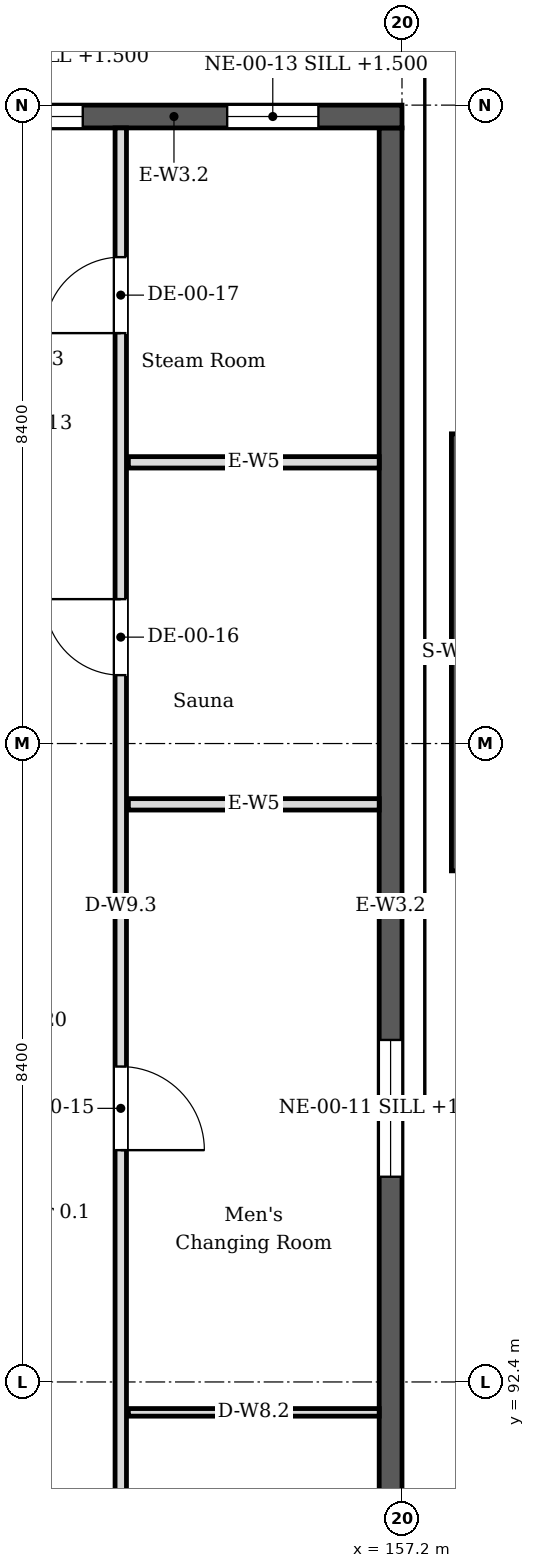
"""IFC4 building model, lengths in metres.
Left out: names, types, materials, properties, quantities, classifications, styles, units other than length and angle.
Written with IfcOpenShell. Run it as: python <this file> out.ifc"""

import sys

from ifc_helpers import new_model, si_unit, direction, frame, frame_2d, origin, place, context, subcontext, project, spatial, rectangle, extrude, element, fill, save


model = new_model("IFC4")
c1 = context("Model", 3, precision=1e-05, world=origin(), true_north=direction((0.0, 1.0)))
c2 = subcontext(c1, "Body", "Model", "MODEL_VIEW")
j1 = project(units=[si_unit("LENGTHUNIT", "METRE"), si_unit("PLANEANGLEUNIT", "RADIAN")], contexts=[c1])
p1 = place(None, origin())
s1 = spatial("IfcSite", under=j1, at=p1, CompositionType="ELEMENT")
p2 = place(p1, origin())
s2 = spatial("IfcBuilding", under=s1, at=p2, CompositionType="ELEMENT")
p3 = place(p2, origin())
s3 = spatial("IfcBuildingStorey", under=s2, at=p3, CompositionType="ELEMENT", Elevation=0.0)
p4 = place(p3, frame((158.0, 99.125, 0.0), z_axis=(0.0, 0.0, 1.0), x_axis=(0.0, 1.0, 0.0)))
e1 = element("IfcWall", 1, at=p4, inside=s3, PredefinedType="SOLIDWALL", context=c2, shape_type="SweptSolid", body=[
    extrude(rectangle(XDim=5.75, YDim=0.3, at=frame_2d((2.875, 0.0))), origin(), (0.0, 0.0, 1.0), 3.4),
])
p5 = place(p3, frame((157.05, 84.0, 0.0), z_axis=(0.0, 0.0, 1.0), x_axis=(0.0, 1.0, 0.0)))
e2 = element("IfcWall", 2, at=p5, inside=s3, PredefinedType="SOLIDWALL", context=c2, shape_type="SweptSolid", body=[
    extrude(rectangle(XDim=24.9, YDim=0.3, at=frame_2d((12.45, 0.0))), origin(), (0.0, 0.0, 1.0), 5.72),
])
p6 = place(p5, frame((3.1, 0.0, 1.5)))
e3 = element("IfcOpeningElement", 3, at=p6, cuts=e2, PredefinedType="OPENING", context=c2, shape_type="SweptSolid", body=[
    extrude(rectangle(XDim=1.8, YDim=1.2, at=frame_2d((0.9, 0.6))), frame((0.0, 0.16, 0.0), z_axis=(0.0, -1.0, 0.0), x_axis=(1.0, 0.0, 0.0)), (0.0, 0.0, 1.0), 0.32),
])
p7 = place(p5, frame((11.1, 0.0, 1.5)))
e4 = element("IfcOpeningElement", 4, at=p7, cuts=e2, PredefinedType="OPENING", context=c2, shape_type="SweptSolid", body=[
    extrude(rectangle(XDim=1.8, YDim=1.2, at=frame_2d((0.9, 0.6))), frame((0.0, 0.16, 0.0), z_axis=(0.0, -1.0, 0.0), x_axis=(1.0, 0.0, 0.0)), (0.0, 0.0, 1.0), 0.32),
])
p8 = place(p3, frame((151.2, 109.05, 0.0), z_axis=(0.0, 0.0, 1.0), x_axis=(1.0, 0.0, 0.0)))
e5 = element("IfcWall", 5, at=p8, inside=s3, PredefinedType="SOLIDWALL", context=c2, shape_type="SweptSolid", body=[
    extrude(rectangle(XDim=6.0, YDim=0.3, at=frame_2d((3.0, 0.0))), origin(), (0.0, 0.0, 1.0), 5.72),
])
p9 = place(p8, frame((0.6, 0.0, 1.5)))
e6 = element("IfcOpeningElement", 6, at=p9, cuts=e5, PredefinedType="OPENING", context=c2, shape_type="SweptSolid", body=[
    extrude(rectangle(XDim=1.2, YDim=1.2, at=frame_2d((0.6, 0.6))), frame((0.0, 0.16, 0.0), z_axis=(0.0, -1.0, 0.0), x_axis=(1.0, 0.0, 0.0)), (0.0, 0.0, 1.0), 0.32),
])
p10 = place(p8, frame((3.7, 0.0, 1.5)))
e7 = element("IfcOpeningElement", 7, at=p10, cuts=e5, PredefinedType="OPENING", context=c2, shape_type="SweptSolid", body=[
    extrude(rectangle(XDim=1.2, YDim=1.2, at=frame_2d((0.6, 0.6))), frame((0.0, 0.16, 0.0), z_axis=(0.0, -1.0, 0.0), x_axis=(1.0, 0.0, 0.0)), (0.0, 0.0, 1.0), 0.32),
])
p11 = place(p3, frame((153.5, 84.2, 0.0), z_axis=(0.0, 0.0, 1.0), x_axis=(0.0, 1.0, 0.0)))
e8 = element("IfcWall", 8, at=p11, inside=s3, PredefinedType="PARTITIONING", context=c2, shape_type="SweptSolid", body=[
    extrude(rectangle(XDim=24.7, YDim=0.15, at=frame_2d((12.35, 0.0))), origin(), (0.0, 0.0, 1.0), 5.72),
])
p12 = place(p11, frame((3.25, 0.0, 0.0)))
e9 = element("IfcOpeningElement", 9, at=p12, cuts=e8, PredefinedType="OPENING", context=c2, shape_type="SweptSolid", body=[
    extrude(rectangle(XDim=1.1, YDim=2.4, at=frame_2d((0.55, 1.2))), frame((0.0, 0.085, 0.0), z_axis=(0.0, -1.0, 0.0), x_axis=(1.0, 0.0, 0.0)), (0.0, 0.0, 1.0), 0.17),
])
p13 = place(p11, frame((11.25, 0.0, 0.0)))
e10 = element("IfcOpeningElement", 10, at=p13, cuts=e8, PredefinedType="OPENING", context=c2, shape_type="SweptSolid", body=[
    extrude(rectangle(XDim=1.1, YDim=2.4, at=frame_2d((0.55, 1.2))), frame((0.0, 0.085, 0.0), z_axis=(0.0, -1.0, 0.0), x_axis=(1.0, 0.0, 0.0)), (0.0, 0.0, 1.0), 0.17),
])
p14 = place(p11, frame((17.5, 0.0, 0.0)))
e11 = element("IfcOpeningElement", 11, at=p14, cuts=e8, PredefinedType="OPENING", context=c2, shape_type="SweptSolid", body=[
    extrude(rectangle(XDim=1.0, YDim=2.1, at=frame_2d((0.5, 1.05))), frame((0.0, 0.085, 0.0), z_axis=(0.0, -1.0, 0.0), x_axis=(1.0, 0.0, 0.0)), (0.0, 0.0, 1.0), 0.17),
])
p15 = place(p11, frame((22.0, 0.0, 0.0)))
e12 = element("IfcOpeningElement", 12, at=p15, cuts=e8, PredefinedType="OPENING", context=c2, shape_type="SweptSolid", body=[
    extrude(rectangle(XDim=1.0, YDim=2.1, at=frame_2d((0.5, 1.05))), frame((0.0, 0.085, 0.0), z_axis=(0.0, -1.0, 0.0), x_axis=(1.0, 0.0, 0.0)), (0.0, 0.0, 1.0), 0.17),
])
p16 = place(p3, frame((153.6, 92.0, 0.0), z_axis=(0.0, 0.0, 1.0), x_axis=(1.0, 0.0, 0.0)))
e13 = element("IfcWall", 13, at=p16, inside=s3, PredefinedType="PARTITIONING", context=c2, shape_type="SweptSolid", body=[
    extrude(rectangle(XDim=3.3, YDim=0.1, at=frame_2d((1.65, 0.0))), origin(), (0.0, 0.0, 1.0), 5.72),
])
for number, where, z_axis, x_axis in (
    (14, (153.6, 100.0, 0.0), (0.0, 0.0, 1.0), (1.0, 0.0, 0.0)),
    (15, (153.6, 104.5, 0.0), (0.0, 0.0, 1.0), (1.0, 0.0, 0.0)),
):
    element("IfcWall", number, at=place(p3, frame(where, z_axis=z_axis, x_axis=x_axis)), inside=s3, PredefinedType="PARTITIONING", context=c2, shape_type="SweptSolid", body=[
        extrude(rectangle(XDim=3.3, YDim=0.15, at=frame_2d((1.65, 0.0))), origin(), (0.0, 0.0, 1.0), 5.72),
    ])
p17 = place(p7, origin())
e16 = element("IfcWindow", 16, at=p17, inside=s3, PartitioningType="SINGLE_PANEL", PredefinedType="WINDOW", context=c2, shape_type="SweptSolid", body=[
    extrude(rectangle(XDim=1.8, YDim=1.2, at=frame_2d((0.9, 0.6))), frame((0.0, 0.03, 0.0), z_axis=(0.0, -1.0, 0.0), x_axis=(1.0, 0.0, 0.0)), (0.0, 0.0, 1.0), 0.06),
])
fill(e4, e16)
p18 = place(p9, origin())
e17 = element("IfcWindow", 17, at=p18, inside=s3, PartitioningType="SINGLE_PANEL", PredefinedType="WINDOW", context=c2, shape_type="SweptSolid", body=[
    extrude(rectangle(XDim=1.2, YDim=1.2, at=frame_2d((0.6, 0.6))), frame((0.0, 0.03, 0.0), z_axis=(0.0, -1.0, 0.0), x_axis=(1.0, 0.0, 0.0)), (0.0, 0.0, 1.0), 0.06),
])
fill(e6, e17)
p19 = place(p10, origin())
e18 = element("IfcWindow", 18, at=p19, inside=s3, PartitioningType="SINGLE_PANEL", PredefinedType="WINDOW", context=c2, shape_type="SweptSolid", body=[
    extrude(rectangle(XDim=1.2, YDim=1.2, at=frame_2d((0.6, 0.6))), frame((0.0, 0.03, 0.0), z_axis=(0.0, -1.0, 0.0), x_axis=(1.0, 0.0, 0.0)), (0.0, 0.0, 1.0), 0.06),
])
fill(e7, e18)
p20 = place(p13, origin())
e19 = element("IfcDoor", 19, at=p20, inside=s3, OperationType="SINGLE_SWING_LEFT", PredefinedType="DOOR", context=c2, shape_type="SweptSolid", body=[
    extrude(rectangle(XDim=1.1, YDim=2.4, at=frame_2d((0.55, 1.2))), frame((0.0, 0.025, 0.0), z_axis=(0.0, -1.0, 0.0), x_axis=(1.0, 0.0, 0.0)), (0.0, 0.0, 1.0), 0.05),
])
fill(e10, e19)
p21 = place(p14, origin())
e20 = element("IfcDoor", 20, at=p21, inside=s3, OperationType="SINGLE_SWING_LEFT", PredefinedType="DOOR", context=c2, shape_type="SweptSolid", body=[
    extrude(rectangle(XDim=1.0, YDim=2.1, at=frame_2d((0.5, 1.05))), frame((0.0, 0.025, 0.0), z_axis=(0.0, -1.0, 0.0), x_axis=(1.0, 0.0, 0.0)), (0.0, 0.0, 1.0), 0.05),
])
fill(e11, e20)
p22 = place(p15, origin())
e21 = element("IfcDoor", 21, at=p22, inside=s3, OperationType="SINGLE_SWING_LEFT", PredefinedType="DOOR", context=c2, shape_type="SweptSolid", body=[
    extrude(rectangle(XDim=1.0, YDim=2.1, at=frame_2d((0.5, 1.05))), frame((0.0, 0.025, 0.0), z_axis=(0.0, -1.0, 0.0), x_axis=(1.0, 0.0, 0.0)), (0.0, 0.0, 1.0), 0.05),
])
fill(e12, e21)
save(model, sys.argv[1])
